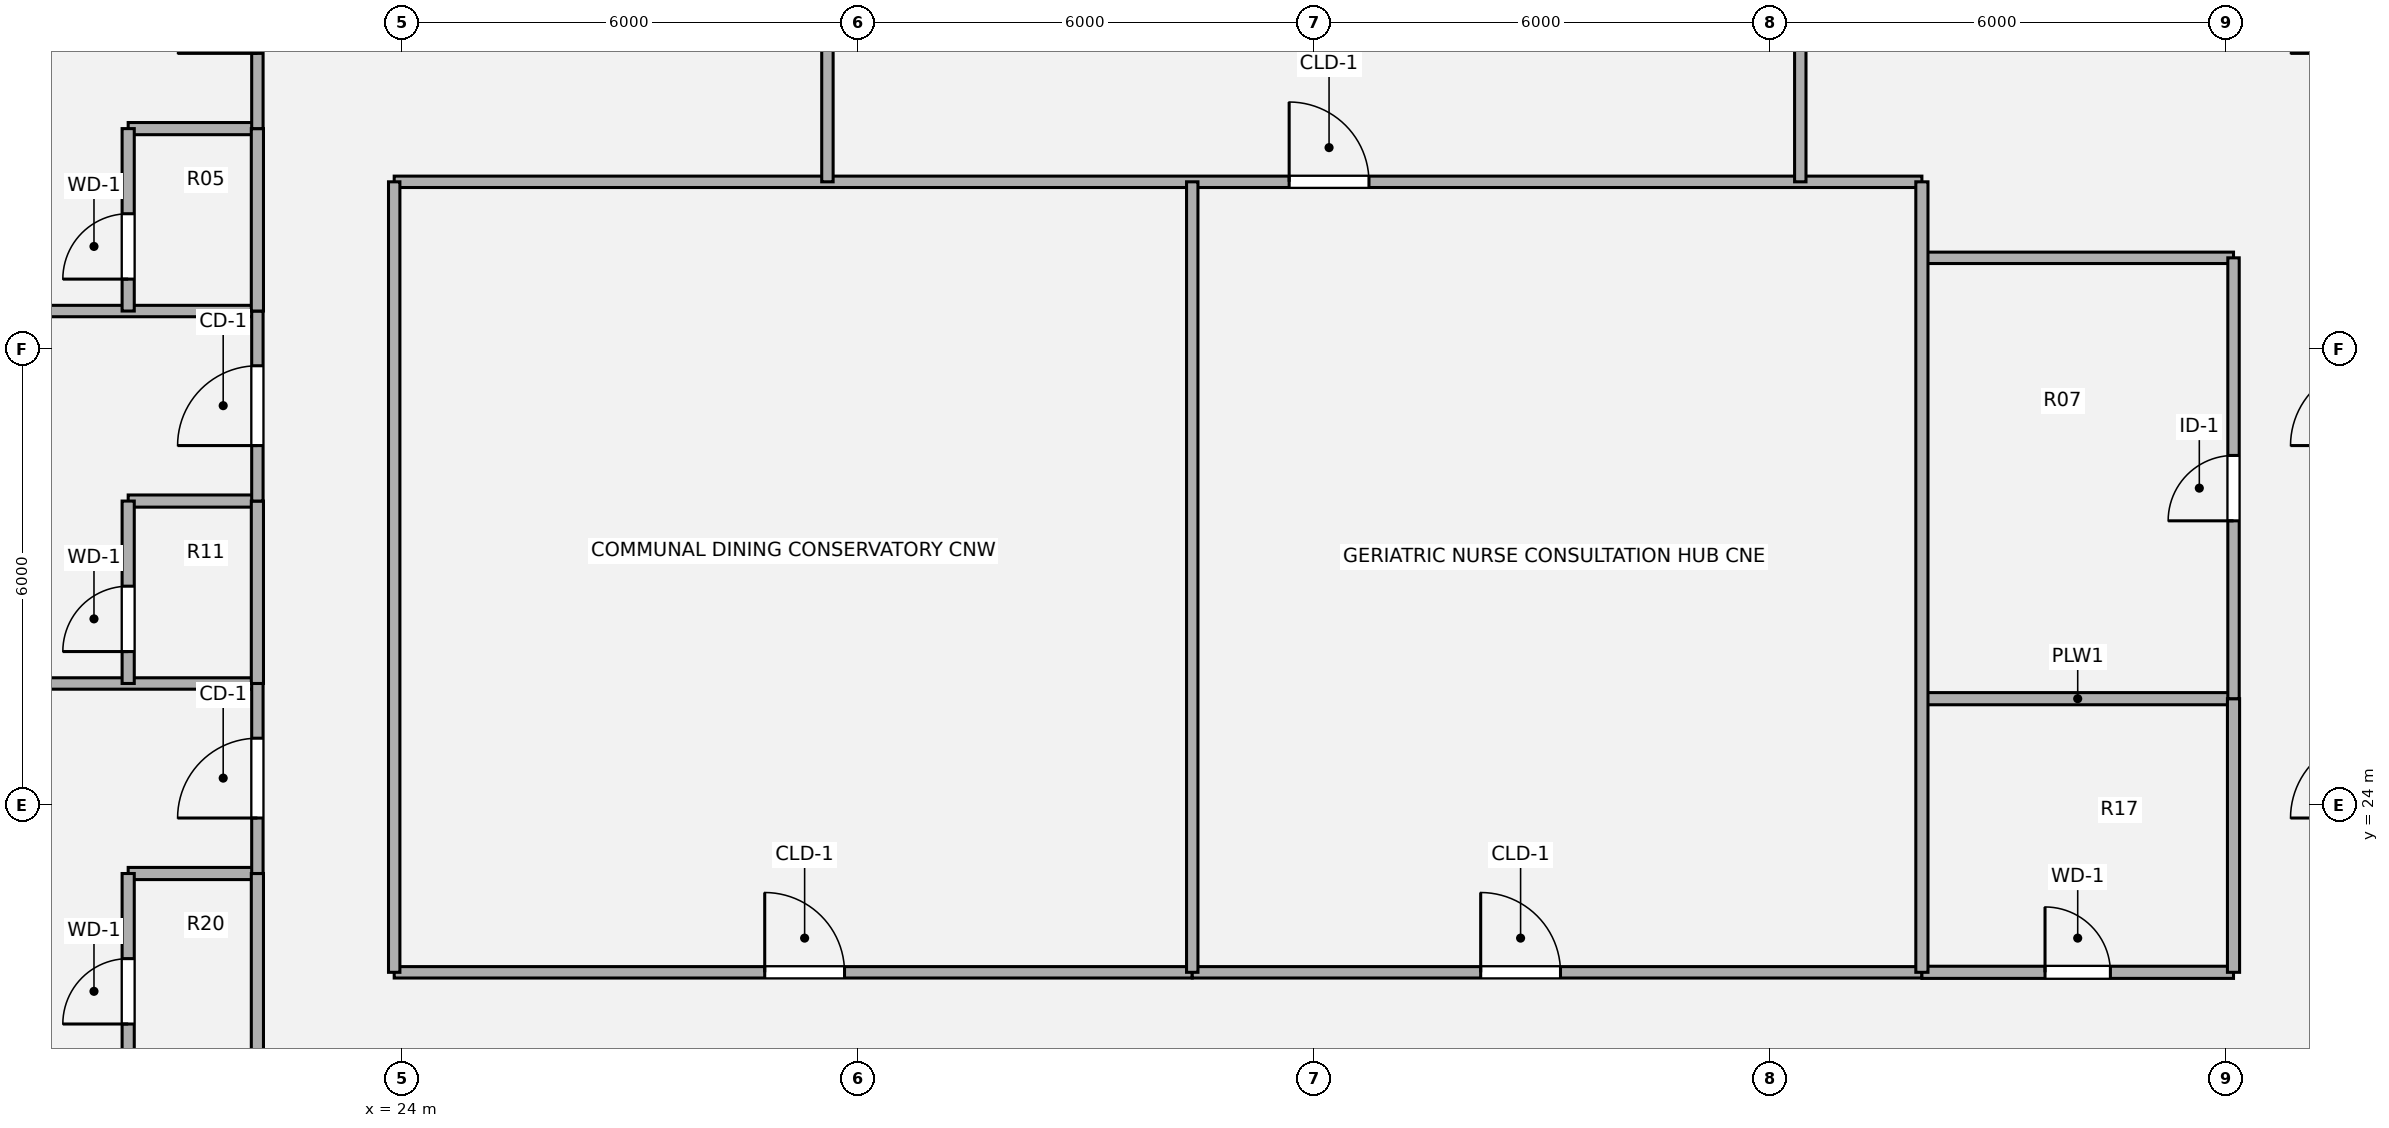
"""IFC4 building model, lengths in metres.
Left out: names, types, materials, properties, quantities, classifications, styles, units other than length and angle.
Written with IfcOpenShell. Run it as: python <this file> out.ifc"""

import sys

from ifc_helpers import new_model, si_unit, direction, frame, frame_2d, origin, origin_2d, place, context, subcontext, project, spatial, rectangle, extrude, source, transform, mapped, element, fill, save


model = new_model("IFC4")
c1 = context("Model", 3, precision=1e-05, world=origin(), true_north=direction((0.0, 1.0)))
c2 = subcontext(c1, "Body", "Model", "MODEL_VIEW")
j1 = project(units=[si_unit("LENGTHUNIT", "METRE"), si_unit("PLANEANGLEUNIT", "RADIAN")], contexts=[c1])
p1 = place(None, origin())
s1 = spatial("IfcSite", under=j1, at=p1, CompositionType="ELEMENT")
p2 = place(p1, origin())
s2 = spatial("IfcBuilding", under=s1, at=p2, CompositionType="ELEMENT")
p3 = place(p2, frame((0.0, 0.0, 64.8)))
s3 = spatial("IfcBuildingStorey", under=s2, at=p3, CompositionType="ELEMENT", Elevation=64.8)
p4 = place(p3, frame((23.9, 21.8, 0.0), z_axis=(0.0, 0.0, 1.0), x_axis=(1.0, 0.0, 0.0)))
e1 = element("IfcWall", 1, at=p4, inside=s3, PredefinedType="PARTITIONING", context=c2, shape_type="SweptSolid", body=[
    extrude(rectangle(XDim=10.5, YDim=0.15, at=frame_2d((5.25, 0.0))), origin(), (0.0, 0.0, 1.0), 2.982),
])
p5 = place(p4, frame((4.875, 0.0, 0.0)))
e2 = element("IfcOpeningElement", 2, at=p5, cuts=e1, PredefinedType="OPENING", context=c2, shape_type="SweptSolid", body=[
    extrude(rectangle(XDim=1.05, YDim=2.1, at=origin_2d()), frame((0.525, 0.085, 1.05), z_axis=(0.0, -1.0, 0.0), x_axis=(1.0, 0.0, 0.0)), (0.0, 0.0, 1.0), 0.17),
])
p6 = place(p3, frame((34.4, 21.8, 0.0), z_axis=(0.0, 0.0, 1.0), x_axis=(1.0, 0.0, 0.0)))
e3 = element("IfcWall", 3, at=p6, inside=s3, PredefinedType="PARTITIONING", context=c2, shape_type="SweptSolid", body=[
    extrude(rectangle(XDim=9.6, YDim=0.15, at=frame_2d((4.8, 0.0))), origin(), (0.0, 0.0, 1.0), 2.982),
])
p7 = place(p6, frame((3.795, 0.0, 0.0)))
e4 = element("IfcOpeningElement", 4, at=p7, cuts=e3, PredefinedType="OPENING", context=c2, shape_type="SweptSolid", body=[
    extrude(rectangle(XDim=1.05, YDim=2.1, at=origin_2d()), frame((0.525, 0.085, 1.05), z_axis=(0.0, -1.0, 0.0), x_axis=(1.0, 0.0, 0.0)), (0.0, 0.0, 1.0), 0.17),
])
p8 = place(p3, frame((44.0, 21.8, 0.0), z_axis=(0.0, 0.0, 1.0), x_axis=(1.0, 0.0, 0.0)))
e5 = element("IfcWall", 5, at=p8, inside=s3, PredefinedType="PLUMBINGWALL", context=c2, shape_type="SweptSolid", body=[
    extrude(rectangle(XDim=4.1, YDim=0.16, at=frame_2d((2.05, 0.0))), origin(), (0.0, 0.0, 1.0), 2.982),
])
p9 = place(p8, frame((1.62, 0.0, 0.0)))
e6 = element("IfcOpeningElement", 6, at=p9, cuts=e5, PredefinedType="OPENING", context=c2, shape_type="SweptSolid", body=[
    extrude(rectangle(XDim=0.86, YDim=2.1, at=origin_2d()), frame((0.43, 0.09, 1.05), z_axis=(0.0, -1.0, 0.0), x_axis=(1.0, 0.0, 0.0)), (0.0, 0.0, 1.0), 0.18),
])
p10 = place(p3, frame((20.4, 23.1, 0.0), z_axis=(0.0, 0.0, 1.0), x_axis=(1.0, 0.0, 0.0)))
e7 = element("IfcWall", 7, at=p10, inside=s3, PredefinedType="PLUMBINGWALL", context=c2, shape_type="SweptSolid", body=[
    extrude(rectangle(XDim=1.7, YDim=0.16, at=frame_2d((0.85, 0.0))), origin(), (0.0, 0.0, 1.0), 3.055),
])
p11 = place(p3, frame((44.0, 25.4, 0.0), z_axis=(0.0, 0.0, 1.0), x_axis=(1.0, 0.0, 0.0)))
e8 = element("IfcWall", 8, at=p11, inside=s3, PredefinedType="PLUMBINGWALL", context=c2, shape_type="SweptSolid", body=[
    extrude(rectangle(XDim=4.1, YDim=0.16, at=frame_2d((2.05, 0.0))), origin(), (0.0, 0.0, 1.0), 3.055),
])
p12 = place(p3, frame((15.9, 25.6, 0.0), z_axis=(0.0, 0.0, 1.0), x_axis=(1.0, 0.0, 0.0)))
e9 = element("IfcWall", 9, at=p12, inside=s3, PredefinedType="PARTITIONING", context=c2, shape_type="SweptSolid", body=[
    extrude(rectangle(XDim=6.2, YDim=0.15, at=frame_2d((3.1, 0.0))), origin(), (0.0, 0.0, 1.0), 2.982),
])
p13 = place(p3, frame((20.4, 28.0, 0.0), z_axis=(0.0, 0.0, 1.0), x_axis=(1.0, 0.0, 0.0)))
e10 = element("IfcWall", 10, at=p13, inside=s3, PredefinedType="PLUMBINGWALL", context=c2, shape_type="SweptSolid", body=[
    extrude(rectangle(XDim=1.7, YDim=0.16, at=frame_2d((0.85, 0.0))), origin(), (0.0, 0.0, 1.0), 2.982),
])
p14 = place(p3, frame((15.9, 30.5, 0.0), z_axis=(0.0, 0.0, 1.0), x_axis=(1.0, 0.0, 0.0)))
e11 = element("IfcWall", 11, at=p14, inside=s3, PredefinedType="PARTITIONING", context=c2, shape_type="SweptSolid", body=[
    extrude(rectangle(XDim=6.2, YDim=0.15, at=frame_2d((3.1, 0.0))), origin(), (0.0, 0.0, 1.0), 2.903),
])
p15 = place(p3, frame((44.0, 31.2, 0.0), z_axis=(0.0, 0.0, 1.0), x_axis=(1.0, 0.0, 0.0)))
e12 = element("IfcWall", 12, at=p15, inside=s3, PredefinedType="PARTITIONING", context=c2, shape_type="SweptSolid", body=[
    extrude(rectangle(XDim=4.1, YDim=0.15, at=frame_2d((2.05, 0.0))), origin(), (0.0, 0.0, 1.0), 3.5),
])
p16 = place(p3, frame((23.9, 32.2, 0.0), z_axis=(0.0, 0.0, 1.0), x_axis=(1.0, 0.0, 0.0)))
e13 = element("IfcWall", 13, at=p16, inside=s3, PredefinedType="PARTITIONING", context=c2, shape_type="SweptSolid", body=[
    extrude(rectangle(XDim=20.1, YDim=0.15, at=frame_2d((10.05, 0.0))), origin(), (0.0, 0.0, 1.0), 3.259),
])
p17 = place(p16, frame((11.775, 0.0, 0.0)))
e14 = element("IfcOpeningElement", 14, at=p17, cuts=e13, PredefinedType="OPENING", context=c2, shape_type="SweptSolid", body=[
    extrude(rectangle(XDim=1.05, YDim=2.1, at=origin_2d()), frame((0.525, 0.085, 1.05), z_axis=(0.0, -1.0, 0.0), x_axis=(1.0, 0.0, 0.0)), (0.0, 0.0, 1.0), 0.17),
])
p18 = place(p3, frame((20.4, 32.9, 0.0), z_axis=(0.0, 0.0, 1.0), x_axis=(1.0, 0.0, 0.0)))
e15 = element("IfcWall", 15, at=p18, inside=s3, PredefinedType="PLUMBINGWALL", context=c2, shape_type="SweptSolid", body=[
    extrude(rectangle(XDim=1.7, YDim=0.16, at=frame_2d((0.85, 0.0))), origin(), (0.0, 0.0, 1.0), 3.055),
])
p19 = place(p3, frame((20.4, 20.7, 0.0), z_axis=(0.0, 0.0, 1.0), x_axis=(0.0, 1.0, 0.0)))
e16 = element("IfcWall", 16, at=p19, inside=s3, PredefinedType="PLUMBINGWALL", context=c2, shape_type="SweptSolid", body=[
    extrude(rectangle(XDim=2.4, YDim=0.16, at=frame_2d((1.2, 0.0))), origin(), (0.0, 0.0, 1.0), 3.5),
])
p20 = place(p19, frame((0.42, 0.0, 0.0)))
e17 = element("IfcOpeningElement", 17, at=p20, cuts=e16, PredefinedType="OPENING", context=c2, shape_type="SweptSolid", body=[
    extrude(rectangle(XDim=0.86, YDim=2.1, at=origin_2d()), frame((0.43, 0.09, 1.05), z_axis=(0.0, -1.0, 0.0), x_axis=(1.0, 0.0, 0.0)), (0.0, 0.0, 1.0), 0.18),
])
p21 = place(p3, frame((20.4, 25.6, 0.0), z_axis=(0.0, 0.0, 1.0), x_axis=(0.0, 1.0, 0.0)))
e18 = element("IfcWall", 18, at=p21, inside=s3, PredefinedType="PLUMBINGWALL", context=c2, shape_type="SweptSolid", body=[
    extrude(rectangle(XDim=2.4, YDim=0.16, at=frame_2d((1.2, 0.0))), origin(), (0.0, 0.0, 1.0), 3.5),
])
p22 = place(p21, frame((0.42, 0.0, 0.0)))
e19 = element("IfcOpeningElement", 19, at=p22, cuts=e18, PredefinedType="OPENING", context=c2, shape_type="SweptSolid", body=[
    extrude(rectangle(XDim=0.86, YDim=2.1, at=origin_2d()), frame((0.43, 0.09, 1.05), z_axis=(0.0, -1.0, 0.0), x_axis=(1.0, 0.0, 0.0)), (0.0, 0.0, 1.0), 0.18),
])
p23 = place(p3, frame((20.4, 30.5, 0.0), z_axis=(0.0, 0.0, 1.0), x_axis=(0.0, 1.0, 0.0)))
e20 = element("IfcWall", 20, at=p23, inside=s3, PredefinedType="PLUMBINGWALL", context=c2, shape_type="SweptSolid", body=[
    extrude(rectangle(XDim=2.4, YDim=0.16, at=frame_2d((1.2, 0.0))), origin(), (0.0, 0.0, 1.0), 3.5),
])
p24 = place(p23, frame((0.42, 0.0, 0.0)))
e21 = element("IfcOpeningElement", 21, at=p24, cuts=e20, PredefinedType="OPENING", context=c2, shape_type="SweptSolid", body=[
    extrude(rectangle(XDim=0.86, YDim=2.1, at=origin_2d()), frame((0.43, 0.09, 1.05), z_axis=(0.0, -1.0, 0.0), x_axis=(1.0, 0.0, 0.0)), (0.0, 0.0, 1.0), 0.18),
])
p25 = place(p3, frame((22.1, 20.7, 0.0), z_axis=(0.0, 0.0, 1.0), x_axis=(0.0, 1.0, 0.0)))
e22 = element("IfcWall", 22, at=p25, inside=s3, PredefinedType="PLUMBINGWALL", context=c2, shape_type="SweptSolid", body=[
    extrude(rectangle(XDim=2.4, YDim=0.16, at=frame_2d((1.2, 0.0))), origin(), (0.0, 0.0, 1.0), 3.5),
])
p26 = place(p3, frame((22.1, 23.1, 0.0), z_axis=(0.0, 0.0, 1.0), x_axis=(0.0, 1.0, 0.0)))
e23 = element("IfcWall", 23, at=p26, inside=s3, PredefinedType="PARTITIONING", context=c2, shape_type="SweptSolid", body=[
    extrude(rectangle(XDim=2.5, YDim=0.15, at=frame_2d((1.25, 0.0))), origin(), (0.0, 0.0, 1.0), 3.5),
])
p27 = place(p26, frame((0.73, 0.0, 0.0)))
e24 = element("IfcOpeningElement", 24, at=p27, cuts=e23, PredefinedType="OPENING", context=c2, shape_type="SweptSolid", body=[
    extrude(rectangle(XDim=1.05, YDim=2.1, at=origin_2d()), frame((0.525, 0.085, 1.05), z_axis=(0.0, -1.0, 0.0), x_axis=(1.0, 0.0, 0.0)), (0.0, 0.0, 1.0), 0.17),
])
p28 = place(p3, frame((22.1, 25.6, 0.0), z_axis=(0.0, 0.0, 1.0), x_axis=(0.0, 1.0, 0.0)))
e25 = element("IfcWall", 25, at=p28, inside=s3, PredefinedType="PLUMBINGWALL", context=c2, shape_type="SweptSolid", body=[
    extrude(rectangle(XDim=2.4, YDim=0.16, at=frame_2d((1.2, 0.0))), origin(), (0.0, 0.0, 1.0), 3.5),
])
p29 = place(p3, frame((22.1, 28.0, 0.0), z_axis=(0.0, 0.0, 1.0), x_axis=(0.0, 1.0, 0.0)))
e26 = element("IfcWall", 26, at=p29, inside=s3, PredefinedType="PARTITIONING", context=c2, shape_type="SweptSolid", body=[
    extrude(rectangle(XDim=2.5, YDim=0.15, at=frame_2d((1.25, 0.0))), origin(), (0.0, 0.0, 1.0), 3.5),
])
p30 = place(p29, frame((0.73, 0.0, 0.0)))
e27 = element("IfcOpeningElement", 27, at=p30, cuts=e26, PredefinedType="OPENING", context=c2, shape_type="SweptSolid", body=[
    extrude(rectangle(XDim=1.05, YDim=2.1, at=origin_2d()), frame((0.525, 0.085, 1.05), z_axis=(0.0, -1.0, 0.0), x_axis=(1.0, 0.0, 0.0)), (0.0, 0.0, 1.0), 0.17),
])
p31 = place(p3, frame((22.1, 30.5, 0.0), z_axis=(0.0, 0.0, 1.0), x_axis=(0.0, 1.0, 0.0)))
e28 = element("IfcWall", 28, at=p31, inside=s3, PredefinedType="PLUMBINGWALL", context=c2, shape_type="SweptSolid", body=[
    extrude(rectangle(XDim=2.4, YDim=0.16, at=frame_2d((1.2, 0.0))), origin(), (0.0, 0.0, 1.0), 3.5),
])
p32 = place(p3, frame((22.1, 32.9, 0.0), z_axis=(0.0, 0.0, 1.0), x_axis=(0.0, 1.0, 0.0)))
e29 = element("IfcWall", 29, at=p32, inside=s3, PredefinedType="PARTITIONING", context=c2, shape_type="SweptSolid", body=[
    extrude(rectangle(XDim=3.021, YDim=0.15, at=frame_2d((1.51, 0.0))), origin(), (0.0, 0.0, 1.0), 3.5),
])
p33 = place(p32, frame((0.99, 0.0, 0.0)))
e30 = element("IfcOpeningElement", 30, at=p33, cuts=e29, PredefinedType="OPENING", context=c2, shape_type="SweptSolid", body=[
    extrude(rectangle(XDim=1.05, YDim=2.1, at=origin_2d()), frame((0.525, 0.085, 1.05), z_axis=(0.0, -1.0, 0.0), x_axis=(1.0, 0.0, 0.0)), (0.0, 0.0, 1.0), 0.17),
])
p34 = place(p3, frame((23.9, 21.8, 0.0), z_axis=(0.0, 0.0, 1.0), x_axis=(0.0, 1.0, 0.0)))
e31 = element("IfcWall", 31, at=p34, inside=s3, PredefinedType="PARTITIONING", context=c2, shape_type="SweptSolid", body=[
    extrude(rectangle(XDim=10.4, YDim=0.15, at=frame_2d((5.2, 0.0))), origin(), (0.0, 0.0, 1.0), 3.5),
])
p35 = place(p3, frame((29.6, 32.2, 0.0), z_axis=(0.0, 0.0, 1.0), x_axis=(0.0, 1.0, 0.0)))
e32 = element("IfcWall", 32, at=p35, inside=s3, PredefinedType="PARTITIONING", context=c2, shape_type="SweptSolid", body=[
    extrude(rectangle(XDim=4.595, YDim=0.15, at=frame_2d((2.298, 0.0))), origin(), (0.0, 0.0, 1.0), 3.5),
])
p36 = place(p3, frame((34.4, 21.8, 0.0), z_axis=(0.0, 0.0, 1.0), x_axis=(0.0, 1.0, 0.0)))
e33 = element("IfcWall", 33, at=p36, inside=s3, PredefinedType="PARTITIONING", context=c2, shape_type="SweptSolid", body=[
    extrude(rectangle(XDim=10.4, YDim=0.15, at=frame_2d((5.2, 0.0))), origin(), (0.0, 0.0, 1.0), 3.5),
])
p37 = place(p3, frame((42.4, 32.2, 0.0), z_axis=(0.0, 0.0, 1.0), x_axis=(0.0, 1.0, 0.0)))
e34 = element("IfcWall", 34, at=p37, inside=s3, PredefinedType="PARTITIONING", context=c2, shape_type="SweptSolid", body=[
    extrude(rectangle(XDim=4.595, YDim=0.15, at=frame_2d((2.298, 0.0))), origin(), (0.0, 0.0, 1.0), 3.5),
])
p38 = place(p3, frame((44.0, 21.8, 0.0), z_axis=(0.0, 0.0, 1.0), x_axis=(0.0, 1.0, 0.0)))
e35 = element("IfcWall", 35, at=p38, inside=s3, PredefinedType="PLUMBINGWALL", context=c2, shape_type="SweptSolid", body=[
    extrude(rectangle(XDim=10.4, YDim=0.16, at=frame_2d((5.2, 0.0))), origin(), (0.0, 0.0, 1.0), 3.5),
])
p39 = place(p3, frame((48.1, 21.8, 0.0), z_axis=(0.0, 0.0, 1.0), x_axis=(0.0, 1.0, 0.0)))
e36 = element("IfcWall", 36, at=p39, inside=s3, PredefinedType="PLUMBINGWALL", context=c2, shape_type="SweptSolid", body=[
    extrude(rectangle(XDim=3.6, YDim=0.16, at=frame_2d((1.8, 0.0))), origin(), (0.0, 0.0, 1.0), 3.5),
])
p40 = place(p3, frame((48.1, 25.4, 0.0), z_axis=(0.0, 0.0, 1.0), x_axis=(0.0, 1.0, 0.0)))
e37 = element("IfcWall", 37, at=p40, inside=s3, PredefinedType="PARTITIONING", context=c2, shape_type="SweptSolid", body=[
    extrude(rectangle(XDim=5.8, YDim=0.15, at=frame_2d((2.9, 0.0))), origin(), (0.0, 0.0, 1.0), 3.5),
])
p41 = place(p40, frame((2.34, 0.0, 0.0)))
e38 = element("IfcOpeningElement", 38, at=p41, cuts=e37, PredefinedType="OPENING", context=c2, shape_type="SweptSolid", body=[
    extrude(rectangle(XDim=0.86, YDim=2.1, at=origin_2d()), frame((0.43, 0.085, 1.05), z_axis=(0.0, -1.0, 0.0), x_axis=(1.0, 0.0, 0.0)), (0.0, 0.0, 1.0), 0.17),
])
m1 = source(origin(), c2, "Body", "SweptSolid", [
    extrude(rectangle(XDim=1.05, YDim=2.1, at=origin_2d()), frame((0.525, 0.025, 1.05), z_axis=(0.0, -1.0, 0.0), x_axis=(1.0, 0.0, 0.0)), (0.0, 0.0, 1.0), 0.05),
])
p42 = place(p5, origin())
e39 = element("IfcDoor", 39, at=p42, inside=s3, OperationType="SINGLE_SWING_LEFT", PredefinedType="DOOR", context=c2, shape_type="MappedRepresentation", body=[
    mapped(m1, transform((0.0, 0.0, 0.0), x_axis=(1.0, 0.0, 0.0), y_axis=(0.0, 1.0, 0.0), z_axis=(0.0, 0.0, 1.0), scale=1.0)),
])
fill(e2, e39)
p43 = place(p7, origin())
e40 = element("IfcDoor", 40, at=p43, inside=s3, OperationType="SINGLE_SWING_LEFT", PredefinedType="DOOR", context=c2, shape_type="MappedRepresentation", body=[
    mapped(m1, transform((0.0, 0.0, 0.0), x_axis=(1.0, 0.0, 0.0), y_axis=(0.0, 1.0, 0.0), z_axis=(0.0, 0.0, 1.0), scale=1.0)),
])
fill(e4, e40)
m2 = source(origin(), c2, "Body", "SweptSolid", [
    extrude(rectangle(XDim=0.86, YDim=2.1, at=origin_2d()), frame((0.43, 0.025, 1.05), z_axis=(0.0, -1.0, 0.0), x_axis=(1.0, 0.0, 0.0)), (0.0, 0.0, 1.0), 0.05),
])
p44 = place(p9, origin())
e41 = element("IfcDoor", 41, at=p44, inside=s3, OperationType="SINGLE_SWING_LEFT", PredefinedType="DOOR", context=c2, shape_type="MappedRepresentation", body=[
    mapped(m2, transform((0.0, 0.0, 0.0), x_axis=(1.0, 0.0, 0.0), y_axis=(0.0, 1.0, 0.0), z_axis=(0.0, 0.0, 1.0), scale=1.0)),
])
fill(e6, e41)
p45 = place(p17, origin())
e42 = element("IfcDoor", 42, at=p45, inside=s3, OperationType="SINGLE_SWING_LEFT", PredefinedType="DOOR", context=c2, shape_type="MappedRepresentation", body=[
    mapped(m1, transform((0.0, 0.0, 0.0), x_axis=(1.0, 0.0, 0.0), y_axis=(0.0, 1.0, 0.0), z_axis=(0.0, 0.0, 1.0), scale=1.0)),
])
fill(e14, e42)
p46 = place(p20, origin())
e43 = element("IfcDoor", 43, at=p46, inside=s3, OperationType="SINGLE_SWING_LEFT", PredefinedType="DOOR", context=c2, shape_type="MappedRepresentation", body=[
    mapped(m2, transform((0.0, 0.0, 0.0), x_axis=(1.0, 0.0, 0.0), y_axis=(0.0, 1.0, 0.0), z_axis=(0.0, 0.0, 1.0), scale=1.0)),
])
fill(e17, e43)
p47 = place(p22, origin())
e44 = element("IfcDoor", 44, at=p47, inside=s3, OperationType="SINGLE_SWING_LEFT", PredefinedType="DOOR", context=c2, shape_type="MappedRepresentation", body=[
    mapped(m2, transform((0.0, 0.0, 0.0), x_axis=(1.0, 0.0, 0.0), y_axis=(0.0, 1.0, 0.0), z_axis=(0.0, 0.0, 1.0), scale=1.0)),
])
fill(e19, e44)
p48 = place(p24, origin())
e45 = element("IfcDoor", 45, at=p48, inside=s3, OperationType="SINGLE_SWING_LEFT", PredefinedType="DOOR", context=c2, shape_type="MappedRepresentation", body=[
    mapped(m2, transform((0.0, 0.0, 0.0), x_axis=(1.0, 0.0, 0.0), y_axis=(0.0, 1.0, 0.0), z_axis=(0.0, 0.0, 1.0), scale=1.0)),
])
fill(e21, e45)
m3 = source(origin(), c2, "Body", "SweptSolid", [
    extrude(rectangle(XDim=1.05, YDim=2.1, at=origin_2d()), frame((0.525, 0.025, 1.05), z_axis=(0.0, -1.0, 0.0), x_axis=(1.0, 0.0, 0.0)), (0.0, 0.0, 1.0), 0.05),
])
p49 = place(p27, origin())
e46 = element("IfcDoor", 46, at=p49, inside=s3, OperationType="SINGLE_SWING_LEFT", PredefinedType="DOOR", context=c2, shape_type="MappedRepresentation", body=[
    mapped(m3, transform((0.0, 0.0, 0.0), x_axis=(1.0, 0.0, 0.0), y_axis=(0.0, 1.0, 0.0), z_axis=(0.0, 0.0, 1.0), scale=1.0)),
])
fill(e24, e46)
p50 = place(p30, origin())
e47 = element("IfcDoor", 47, at=p50, inside=s3, OperationType="SINGLE_SWING_LEFT", PredefinedType="DOOR", context=c2, shape_type="MappedRepresentation", body=[
    mapped(m3, transform((0.0, 0.0, 0.0), x_axis=(1.0, 0.0, 0.0), y_axis=(0.0, 1.0, 0.0), z_axis=(0.0, 0.0, 1.0), scale=1.0)),
])
fill(e27, e47)
p51 = place(p33, origin())
e48 = element("IfcDoor", 48, at=p51, inside=s3, OperationType="SINGLE_SWING_LEFT", PredefinedType="DOOR", context=c2, shape_type="MappedRepresentation", body=[
    mapped(m3, transform((0.0, 0.0, 0.0), x_axis=(1.0, 0.0, 0.0), y_axis=(0.0, 1.0, 0.0), z_axis=(0.0, 0.0, 1.0), scale=1.0)),
])
fill(e30, e48)
m4 = source(origin(), c2, "Body", "SweptSolid", [
    extrude(rectangle(XDim=0.86, YDim=2.1, at=origin_2d()), frame((0.43, 0.025, 1.05), z_axis=(0.0, -1.0, 0.0), x_axis=(1.0, 0.0, 0.0)), (0.0, 0.0, 1.0), 0.05),
])
p52 = place(p41, origin())
e49 = element("IfcDoor", 49, at=p52, inside=s3, OperationType="SINGLE_SWING_LEFT", PredefinedType="DOOR", context=c2, shape_type="MappedRepresentation", body=[
    mapped(m4, transform((0.0, 0.0, 0.0), x_axis=(1.0, 0.0, 0.0), y_axis=(0.0, 1.0, 0.0), z_axis=(0.0, 0.0, 1.0), scale=1.0)),
])
fill(e38, e49)
save(model, sys.argv[1])
